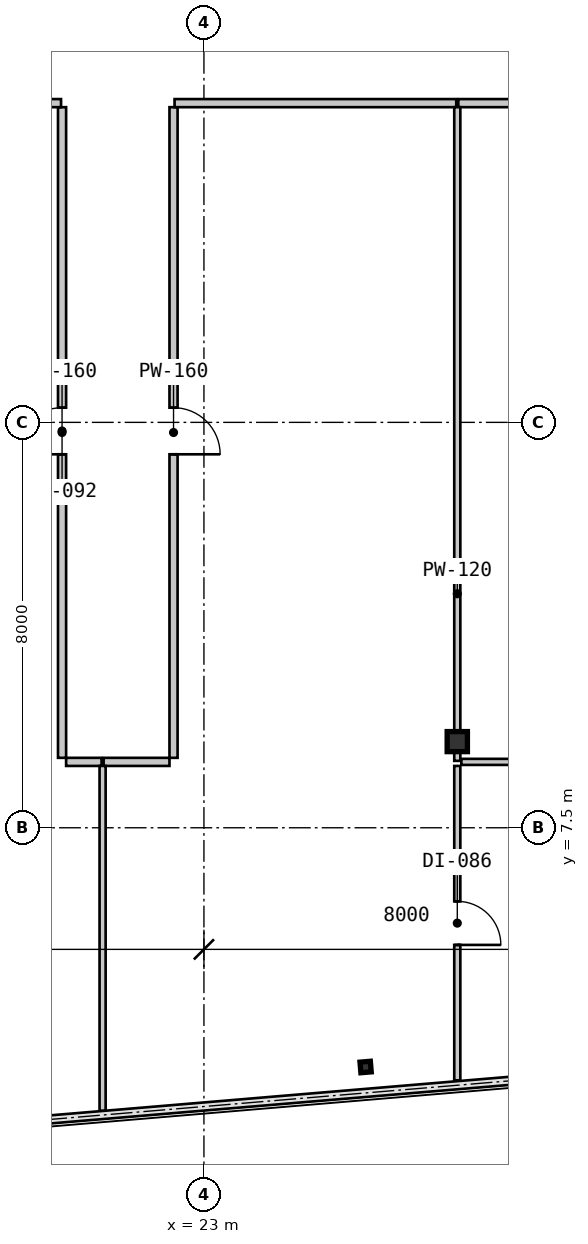
"""IFC4 building model, lengths in metres.
Left out: names, types, materials, properties, quantities, classifications, styles, units other than length and angle.
Written with IfcOpenShell. Run it as: python <this file> out.ifc"""

import sys

from ifc_helpers import new_model, si_unit, direction, frame, frame_2d, origin, origin_2d, place, context, subcontext, project, spatial, rectangle, i_section, extrude, source, transform, mapped, element, fill, save


model = new_model("IFC4")
c1 = context("Model", 3, precision=1e-05, world=origin(), true_north=direction((0.0, 1.0)))
c2 = subcontext(c1, "Body", "Model", "MODEL_VIEW")
j1 = project(units=[si_unit("LENGTHUNIT", "METRE"), si_unit("PLANEANGLEUNIT", "RADIAN")], contexts=[c1])
p1 = place(None, origin())
s1 = spatial("IfcSite", under=j1, at=p1, CompositionType="ELEMENT")
p2 = place(p1, origin())
s2 = spatial("IfcBuilding", under=s1, at=p2, CompositionType="ELEMENT")
p3 = place(p2, frame((0.0, 0.0, 172.55)))
s3 = spatial("IfcBuildingStorey", under=s2, at=p3, CompositionType="ELEMENT", Elevation=172.55)
m1 = source(origin(), c2, "Body", "SweptSolid", [
    extrude(i_section(OverallWidth=0.4, OverallDepth=0.396, WebThickness=0.022, FlangeThickness=0.034, at=origin_2d()), origin(), (0.0, 0.0, 1.0), 3.15),
])
p4 = place(p3, frame((28.0, 9.2, 0.0), z_axis=(0.0, 0.0, 1.0), x_axis=(1.0, 0.0, 0.0)))
e1 = element("IfcColumn", 1, at=p4, inside=s3, PredefinedType="COLUMN", context=c2, shape_type="MappedRepresentation", body=[
    mapped(m1, transform((0.0, 0.0, 0.0), scale=1.0)),
])
m2 = source(origin(), c2, "Body", "SweptSolid", [
    extrude(i_section(OverallWidth=0.205, OverallDepth=0.21, WebThickness=0.009, FlangeThickness=0.014, at=origin_2d()), origin(), (0.0, 0.0, 1.0), 3.15),
])
p5 = place(p3, frame((26.191, 2.779, 0.0), z_axis=(0.0, 0.0, 1.0), x_axis=(0.99649285925, 0.083677843332, 0.0)))
e2 = element("IfcColumn", 2, at=p5, inside=s3, PredefinedType="COLUMN", context=c2, shape_type="MappedRepresentation", body=[
    mapped(m2, transform((0.0, 0.0, 0.0), scale=1.0)),
])
m3 = source(origin(), c2, "Body", "SweptSolid", [
    extrude(rectangle(XDim=12.84, YDim=0.16, at=frame_2d((6.42, 0.0))), origin(), (0.0, 0.0, 1.0), 2.93),
])
p6 = place(p3, frame((20.2, 8.88, 0.0), z_axis=(0.0, 0.0, 1.0), x_axis=(0.0, 1.0, 0.0)))
e3 = element("IfcWall", 3, at=p6, inside=s3, PredefinedType="PARTITIONING", context=c2, shape_type="MappedRepresentation", body=[
    mapped(m3, transform((0.0, 0.0, 0.0), scale=1.0)),
])
m4 = source(origin(), c2, "Body", "SweptSolid", [
    extrude(rectangle(XDim=0.92, YDim=2.1, at=frame_2d((0.46, 1.05))), frame((0.0, 0.09, 0.0), z_axis=(0.0, -1.0, 0.0), x_axis=(1.0, 0.0, 0.0)), (0.0, 0.0, 1.0), 0.18),
])
p7 = place(p6, frame((5.99, 0.0, 0.0)))
e4 = element("IfcOpeningElement", 4, at=p7, cuts=e3, PredefinedType="OPENING", context=c2, shape_type="MappedRepresentation", body=[
    mapped(m4, transform((0.0, 0.0, 0.0), scale=1.0)),
])
m5 = source(origin(), c2, "Body", "SweptSolid", [
    extrude(rectangle(XDim=5.659, YDim=0.16, at=frame_2d((2.83, 0.0))), origin(), (0.0, 0.0, 1.0), 2.93),
])
p8 = place(p3, frame((20.18, 21.8, 0.0), z_axis=(0.0, 0.0, 1.0), x_axis=(-1.0, 0.0, 0.0)))
e5 = element("IfcWall", 5, at=p8, inside=s3, PredefinedType="PARTITIONING", context=c2, shape_type="MappedRepresentation", body=[
    mapped(m5, transform((0.0, 0.0, 0.0), scale=1.0)),
])
m6 = source(origin(), c2, "Body", "SweptSolid", [
    extrude(rectangle(XDim=0.7, YDim=0.16, at=frame_2d((0.35, 0.0))), origin(), (0.0, 0.0, 1.0), 2.93),
])
p9 = place(p3, frame((20.98, 8.8, 0.0), z_axis=(0.0, 0.0, 1.0), x_axis=(-1.0, 0.0, 0.0)))
e6 = element("IfcWall", 6, at=p9, inside=s3, PredefinedType="PARTITIONING", context=c2, shape_type="MappedRepresentation", body=[
    mapped(m6, transform((0.0, 0.0, 0.0), scale=1.0)),
])
p10 = place(p3, frame((22.4, 21.72, 0.0), z_axis=(0.0, 0.0, 1.0), x_axis=(0.0, -1.0, 0.0)))
e7 = element("IfcWall", 7, at=p10, inside=s3, PredefinedType="PARTITIONING", context=c2, shape_type="MappedRepresentation", body=[
    mapped(m3, transform((0.0, 0.0, 0.0), scale=1.0)),
])
p11 = place(p10, frame((5.93, 0.0, 0.0)))
e8 = element("IfcOpeningElement", 8, at=p11, cuts=e7, PredefinedType="OPENING", context=c2, shape_type="MappedRepresentation", body=[
    mapped(m4, transform((0.0, 0.0, 0.0), scale=1.0)),
])
m7 = source(origin(), c2, "Body", "SweptSolid", [
    extrude(rectangle(XDim=5.56, YDim=0.16, at=frame_2d((2.78, 0.0))), origin(), (0.0, 0.0, 1.0), 2.93),
])
p12 = place(p3, frame((27.98, 21.8, 0.0), z_axis=(0.0, 0.0, 1.0), x_axis=(-1.0, 0.0, 0.0)))
e9 = element("IfcWall", 9, at=p12, inside=s3, PredefinedType="PARTITIONING", context=c2, shape_type="MappedRepresentation", body=[
    mapped(m7, transform((0.0, 0.0, 0.0), scale=1.0)),
])
m8 = source(origin(), c2, "Body", "SweptSolid", [
    extrude(rectangle(XDim=1.3, YDim=0.16, at=frame_2d((0.65, 0.0))), origin(), (0.0, 0.0, 1.0), 2.93),
])
p13 = place(p3, frame((22.32, 8.8, 0.0), z_axis=(0.0, 0.0, 1.0), x_axis=(-1.0, 0.0, 0.0)))
e10 = element("IfcWall", 10, at=p13, inside=s3, PredefinedType="PARTITIONING", context=c2, shape_type="MappedRepresentation", body=[
    mapped(m8, transform((0.0, 0.0, 0.0), scale=1.0)),
])
m9 = source(origin(), c2, "Body", "SweptSolid", [
    extrude(rectangle(XDim=6.959, YDim=0.16, at=frame_2d((3.48, 0.0))), origin(), (0.0, 0.0, 1.0), 2.93),
])
p14 = place(p3, frame((34.98, 21.8, 0.0), z_axis=(0.0, 0.0, 1.0), x_axis=(-1.0, 0.0, 0.0)))
e11 = element("IfcWall", 11, at=p14, inside=s3, PredefinedType="PARTITIONING", context=c2, shape_type="MappedRepresentation", body=[
    mapped(m9, transform((0.0, 0.0, 0.0), scale=1.0)),
])
p15 = place(p14, frame((3.02, 0.0, 0.0)))
e12 = element("IfcOpeningElement", 12, at=p15, cuts=e11, PredefinedType="OPENING", context=c2, shape_type="MappedRepresentation", body=[
    mapped(m4, transform((0.0, 0.0, 0.0), scale=1.0)),
])
m10 = source(origin(), c2, "Body", "SweptSolid", [
    extrude(rectangle(XDim=6.204, YDim=0.12, at=frame_2d((3.102, 0.0))), origin(), (0.0, 0.0, 1.0), 2.93),
])
p16 = place(p3, frame((28.0, 2.516, 0.0), z_axis=(0.0, 0.0, 1.0), x_axis=(0.0, 1.0, 0.0)))
e13 = element("IfcWall", 13, at=p16, inside=s3, PredefinedType="PARTITIONING", context=c2, shape_type="MappedRepresentation", body=[
    mapped(m10, transform((0.0, 0.0, 0.0), scale=1.0)),
])
m11 = source(origin(), c2, "Body", "SweptSolid", [
    extrude(rectangle(XDim=0.86, YDim=2.1, at=frame_2d((0.43, 1.05))), frame((0.0, 0.07, 0.0), z_axis=(0.0, -1.0, 0.0), x_axis=(1.0, 0.0, 0.0)), (0.0, 0.0, 1.0), 0.14),
])
p17 = place(p16, frame((2.672, 0.0, 0.0)))
e14 = element("IfcOpeningElement", 14, at=p17, cuts=e13, PredefinedType="OPENING", context=c2, shape_type="MappedRepresentation", body=[
    mapped(m11, transform((0.0, 0.0, 0.0), scale=1.0)),
])
m12 = source(origin(), c2, "Body", "SweptSolid", [
    extrude(rectangle(XDim=6.9, YDim=0.12, at=frame_2d((3.45, 0.0))), origin(), (0.0, 0.0, 1.0), 2.93),
])
p18 = place(p3, frame((28.08, 8.8, 0.0), z_axis=(0.0, 0.0, 1.0), x_axis=(1.0, 0.0, 0.0)))
e15 = element("IfcWall", 15, at=p18, inside=s3, PredefinedType="PARTITIONING", context=c2, shape_type="MappedRepresentation", body=[
    mapped(m12, transform((0.0, 0.0, 0.0), scale=1.0)),
])
m13 = source(origin(), c2, "Body", "SweptSolid", [
    extrude(rectangle(XDim=6.806, YDim=0.12, at=frame_2d((3.403, 0.0))), origin(), (0.0, 0.0, 1.0), 2.93),
])
p19 = place(p3, frame((21.0, 8.72, 0.0), z_axis=(0.0, 0.0, 1.0), x_axis=(0.0, -1.0, 0.0)))
e16 = element("IfcWall", 16, at=p19, inside=s3, PredefinedType="PARTITIONING", context=c2, shape_type="MappedRepresentation", body=[
    mapped(m13, transform((0.0, 0.0, 0.0), scale=1.0)),
])
m14 = source(origin(), c2, "Body", "SweptSolid", [
    extrude(rectangle(XDim=12.52, YDim=0.12, at=frame_2d((6.26, 0.0))), origin(), (0.0, 0.0, 1.0), 2.328),
])
p20 = place(p3, frame((28.0, 21.72, 0.0), z_axis=(0.0, 0.0, 1.0), x_axis=(0.0, -1.0, 0.0)))
e17 = element("IfcWall", 17, at=p20, inside=s3, PredefinedType="PARTITIONING", context=c2, shape_type="MappedRepresentation", body=[
    mapped(m14, transform((0.0, 0.0, 0.0), scale=1.0)),
])
m15 = source(origin(), c2, "Body", "SweptSolid", [
    extrude(rectangle(XDim=0.38, YDim=0.12, at=frame_2d((0.19, 0.0))), origin(), (0.0, 0.0, 1.0), 2.93),
])
p21 = place(p3, frame((28.0, 9.2, 0.0), z_axis=(0.0, 0.0, 1.0), x_axis=(0.0, -1.0, 0.0)))
e18 = element("IfcWall", 18, at=p21, inside=s3, PredefinedType="PARTITIONING", context=c2, shape_type="MappedRepresentation", body=[
    mapped(m15, transform((0.0, 0.0, 0.0), scale=1.0)),
])
m16 = source(origin(), c2, "Body", "SweptSolid", [
    extrude(rectangle(XDim=0.92, YDim=2.1, at=frame_2d((0.46, 1.05))), frame((0.0, 0.025, 0.0), z_axis=(0.0, -1.0, 0.0), x_axis=(1.0, 0.0, 0.0)), (0.0, 0.0, 1.0), 0.05),
])
p22 = place(p7, origin())
e19 = element("IfcDoor", 19, at=p22, inside=s3, OperationType="SINGLE_SWING_LEFT", PredefinedType="DOOR", context=c2, shape_type="MappedRepresentation", body=[
    mapped(m16, transform((0.0, 0.0, 0.0), scale=1.0)),
])
fill(e4, e19)
p23 = place(p11, origin())
e20 = element("IfcDoor", 20, at=p23, inside=s3, OperationType="SINGLE_SWING_RIGHT", PredefinedType="DOOR", context=c2, shape_type="MappedRepresentation", body=[
    mapped(m16, transform((0.0, 0.0, 0.0), scale=1.0)),
])
fill(e8, e20)
m17 = source(origin(), c2, "Body", "SweptSolid", [
    extrude(rectangle(XDim=0.86, YDim=2.1, at=frame_2d((0.43, 1.05))), frame((0.0, 0.025, 0.0), z_axis=(0.0, -1.0, 0.0), x_axis=(1.0, 0.0, 0.0)), (0.0, 0.0, 1.0), 0.05),
])
p24 = place(p17, frame((0.86, 0.0, 0.0), z_axis=(0.0, 0.0, 1.0), x_axis=(-1.0, 0.0, 0.0)))
e21 = element("IfcDoor", 21, at=p24, inside=s3, OperationType="SINGLE_SWING_RIGHT", PredefinedType="DOOR", context=c2, shape_type="MappedRepresentation", body=[
    mapped(m17, transform((0.0, 0.0, 0.0), scale=1.0)),
])
fill(e14, e21)
save(model, sys.argv[1])
